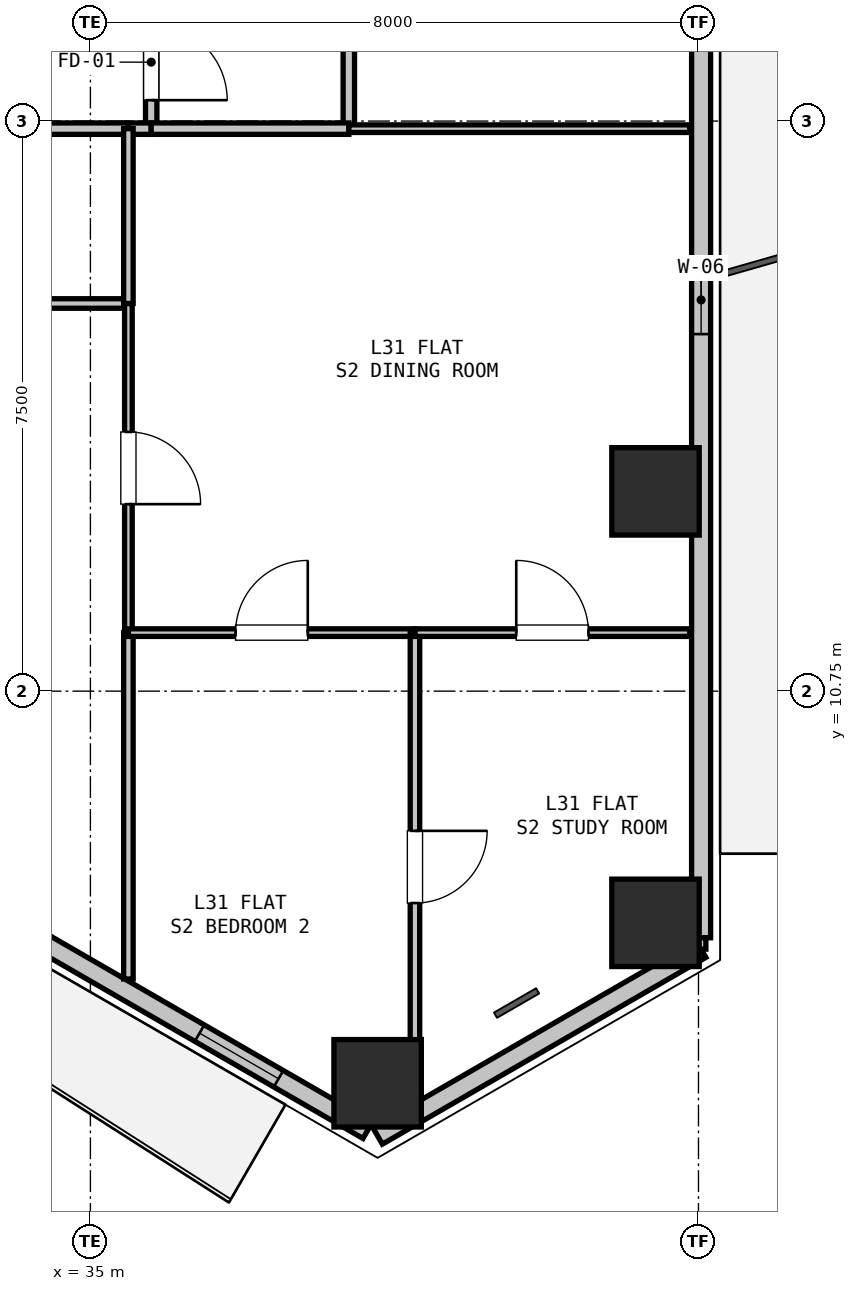
"""IFC4 building model, lengths in metres.
Left out: names, types, materials, properties, quantities, classifications, styles, units other than length and angle.
Written with IfcOpenShell. Run it as: python <this file> out.ifc"""

import sys

from ifc_helpers import new_model, si_unit, direction, frame, frame_2d, origin, origin_2d, place, context, subcontext, project, spatial, rectangle, hollow_rectangle, extrude, element, fill, save


model = new_model("IFC4")
c1 = context("Model", 3, precision=1e-05, world=origin(), true_north=direction((0.0, 1.0)))
c2 = subcontext(c1, "Body", "Model", "MODEL_VIEW")
j1 = project(units=[si_unit("LENGTHUNIT", "METRE"), si_unit("PLANEANGLEUNIT", "RADIAN")], contexts=[c1])
p1 = place(None, origin())
s1 = spatial("IfcSite", under=j1, at=p1, CompositionType="ELEMENT")
p2 = place(p1, origin())
s2 = spatial("IfcBuilding", under=s1, at=p2, CompositionType="ELEMENT")
p3 = place(p2, frame((0.0, 0.0, 113.1)))
s3 = spatial("IfcBuildingStorey", under=s2, at=p3, CompositionType="ELEMENT", Elevation=113.1)
for number, where, z_axis, x_axis in (
    (1, (42.435, 13.378, 0.0), (0.0, 0.0, 1.0), (1.0, 0.0, 0.0)),
    (2, (42.435, 7.702, 0.0), (0.0, 0.0, 1.0), (1.0, 0.0, 0.0)),
    (3, (38.779, 5.591, 0.0), (0.0, 0.0, 1.0), (1.0, 0.0, 0.0)),
):
    element("IfcColumn", number, at=place(p3, frame(where, z_axis=z_axis, x_axis=x_axis)), inside=s3, PredefinedType="COLUMN", context=c2, shape_type="SweptSolid", body=[
        extrude(hollow_rectangle(XDim=1.15, YDim=1.15, WallThickness=0.032, at=origin_2d()), origin(), (0.0, 0.0, 1.0), 3.3),
    ])
p4 = place(p3, frame((43.035, 7.356, 0.0), z_axis=(0.0, 0.0, 1.0), x_axis=(-0.866011848704, -0.500023477353, 0.0)))
e4 = element("IfcWall", 4, at=p4, inside=s3, PredefinedType="SOLIDWALL", context=c2, shape_type="SweptSolid", body=[
    extrude(rectangle(XDim=4.914, YDim=0.25, at=frame_2d((2.457, 0.0))), origin(), (0.0, 0.0, 1.0), 2.64),
])
p5 = place(p3, frame((43.035, 19.435, 0.0), z_axis=(0.0, 0.0, 1.0), x_axis=(0.0, -1.0, 0.0)))
e5 = element("IfcWall", 5, at=p5, inside=s3, PredefinedType="SOLIDWALL", context=c2, shape_type="SweptSolid", body=[
    extrude(rectangle(XDim=11.93, YDim=0.25, at=frame_2d((5.965, 0.0))), origin(), (0.0, 0.0, 1.0), 2.64),
])
p6 = place(p5, frame((3.088, 0.0, 0.9)))
e6 = element("IfcOpeningElement", 6, at=p6, cuts=e5, PredefinedType="OPENING", context=c2, shape_type="SweptSolid", body=[
    extrude(rectangle(XDim=0.9, YDim=1.4, at=frame_2d((0.45, 0.7))), frame((0.0, 0.135, 0.0), z_axis=(0.0, -1.0, 0.0), x_axis=(1.0, 0.0, 0.0)), (0.0, 0.0, 1.0), 0.27),
])
p7 = place(p3, frame((38.649, 4.973, 0.0), z_axis=(0.0, 0.0, 1.0), x_axis=(-0.866023023012, 0.500004123596, 0.0)))
e7 = element("IfcWall", 7, at=p7, inside=s3, PredefinedType="SOLIDWALL", context=c2, shape_type="SweptSolid", body=[
    extrude(rectangle(XDim=11.93, YDim=0.25, at=frame_2d((5.965, 0.0))), origin(), (0.0, 0.0, 1.0), 2.64),
])
p8 = place(p7, frame((7.616, 0.0, 0.0)))
e8 = element("IfcOpeningElement", 8, at=p8, cuts=e7, PredefinedType="OPENING", context=c2, shape_type="SweptSolid", body=[
    extrude(rectangle(XDim=1.1, YDim=2.1, at=frame_2d((0.55, 1.05))), frame((0.0, 0.135, 0.0), z_axis=(0.0, -1.0, 0.0), x_axis=(1.0, 0.0, 0.0)), (0.0, 0.0, 1.0), 0.27),
])
p9 = place(p7, frame((1.355, 0.0, 0.9)))
e9 = element("IfcOpeningElement", 9, at=p9, cuts=e7, PredefinedType="OPENING", context=c2, shape_type="SweptSolid", body=[
    extrude(rectangle(XDim=1.2, YDim=1.4, at=frame_2d((0.6, 0.7))), frame((0.0, 0.135, 0.0), z_axis=(0.0, -1.0, 0.0), x_axis=(1.0, 0.0, 0.0)), (0.0, 0.0, 1.0), 0.27),
])
p10 = place(p3, frame((35.8, 19.9, 0.0), z_axis=(0.0, 0.0, 1.0), x_axis=(0.0, -1.0, 0.0)))
e10 = element("IfcWall", 10, at=p10, inside=s3, PredefinedType="PARTITIONING", context=c2, shape_type="SweptSolid", body=[
    extrude(rectangle(XDim=1.75, YDim=0.15, at=frame_2d((0.875, 0.0))), origin(), (0.0, 0.0, 1.0), 3.02),
])
p11 = place(p10, frame((0.375, 0.0, 0.0)))
e11 = element("IfcOpeningElement", 11, at=p11, cuts=e10, PredefinedType="OPENING", context=c2, shape_type="SweptSolid", body=[
    extrude(rectangle(XDim=1.0, YDim=2.15, at=frame_2d((0.5, 1.075))), frame((0.0, 0.085, 0.0), z_axis=(0.0, -1.0, 0.0), x_axis=(1.0, 0.0, 0.0)), (0.0, 0.0, 1.0), 0.17),
])
p12 = place(p3, frame((35.8, 18.15, 0.0), z_axis=(0.0, 0.0, 1.0), x_axis=(-1.0, 0.0, 0.0)))
e12 = element("IfcWall", 12, at=p12, inside=s3, PredefinedType="PARTITIONING", context=c2, shape_type="SweptSolid", body=[
    extrude(rectangle(XDim=0.3, YDim=0.15, at=frame_2d((0.15, 0.0))), origin(), (0.0, 0.0, 1.0), 3.02),
])
p13 = place(p3, frame((35.5, 18.15, 0.0), z_axis=(0.0, 0.0, 1.0), x_axis=(-1.0, 0.0, 0.0)))
e13 = element("IfcWall", 13, at=p13, inside=s3, PredefinedType="PARTITIONING", context=c2, shape_type="SweptSolid", body=[
    extrude(rectangle(XDim=4.5, YDim=0.15, at=frame_2d((2.25, 0.0))), origin(), (0.0, 0.0, 1.0), 3.02),
])
p14 = place(p3, frame((38.4, 19.9, 0.0), z_axis=(0.0, 0.0, 1.0), x_axis=(0.0, -1.0, 0.0)))
e14 = element("IfcWall", 14, at=p14, inside=s3, PredefinedType="PARTITIONING", context=c2, shape_type="SweptSolid", body=[
    extrude(rectangle(XDim=1.75, YDim=0.15, at=frame_2d((0.875, 0.0))), origin(), (0.0, 0.0, 1.0), 3.02),
])
p15 = place(p3, frame((38.4, 18.15, 0.0), z_axis=(0.0, 0.0, 1.0), x_axis=(-1.0, 0.0, 0.0)))
e15 = element("IfcWall", 15, at=p15, inside=s3, PredefinedType="PARTITIONING", context=c2, shape_type="SweptSolid", body=[
    extrude(rectangle(XDim=2.6, YDim=0.15, at=frame_2d((1.3, 0.0))), origin(), (0.0, 0.0, 1.0), 2.393),
])
p16 = place(p3, frame((31.0, 15.85, 0.0), z_axis=(0.0, 0.0, 1.0), x_axis=(1.0, 0.0, 0.0)))
e16 = element("IfcWall", 16, at=p16, inside=s3, PredefinedType="PARTITIONING", context=c2, shape_type="SweptSolid", body=[
    extrude(rectangle(XDim=4.5, YDim=0.125, at=frame_2d((2.25, 0.0))), origin(), (0.0, 0.0, 1.0), 3.02),
])
p17 = place(p3, frame((35.5, 15.85, 0.0), z_axis=(0.0, 0.0, 1.0), x_axis=(0.0, -1.0, 0.0)))
e17 = element("IfcWall", 17, at=p17, inside=s3, PredefinedType="PARTITIONING", context=c2, shape_type="SweptSolid", body=[
    extrude(rectangle(XDim=4.33, YDim=0.1, at=frame_2d((2.165, 0.0))), origin(), (0.0, 0.0, 1.0), 3.02),
])
p18 = place(p17, frame((1.69, 0.0, 0.0)))
e18 = element("IfcOpeningElement", 18, at=p18, cuts=e17, PredefinedType="OPENING", context=c2, shape_type="SweptSolid", body=[
    extrude(rectangle(XDim=0.95, YDim=2.1, at=frame_2d((0.475, 1.05))), frame((0.0, 0.06, 0.0), z_axis=(0.0, -1.0, 0.0), x_axis=(1.0, 0.0, 0.0)), (0.0, 0.0, 1.0), 0.12),
])
p19 = place(p3, frame((35.5, 11.52, 0.0), z_axis=(0.0, 0.0, 1.0), x_axis=(0.0, -1.0, 0.0)))
e19 = element("IfcWall", 19, at=p19, inside=s3, PredefinedType="PARTITIONING", context=c2, shape_type="SweptSolid", body=[
    extrude(rectangle(XDim=4.557, YDim=0.125, at=frame_2d((2.278, 0.0))), origin(), (0.0, 0.0, 1.0), 2.684),
])
p20 = place(p3, frame((35.5, 11.52, 0.0), z_axis=(0.0, 0.0, 1.0), x_axis=(1.0, 0.0, 0.0)))
e20 = element("IfcWall", 20, at=p20, inside=s3, PredefinedType="PARTITIONING", context=c2, shape_type="SweptSolid", body=[
    extrude(rectangle(XDim=3.77, YDim=0.1, at=frame_2d((1.885, 0.0))), origin(), (0.0, 0.0, 1.0), 3.02),
])
p21 = place(p20, frame((1.41, 0.0, 0.0)))
e21 = element("IfcOpeningElement", 21, at=p21, cuts=e20, PredefinedType="OPENING", context=c2, shape_type="SweptSolid", body=[
    extrude(rectangle(XDim=0.95, YDim=2.1, at=frame_2d((0.475, 1.05))), frame((0.0, 0.06, 0.0), z_axis=(0.0, -1.0, 0.0), x_axis=(1.0, 0.0, 0.0)), (0.0, 0.0, 1.0), 0.12),
])
p22 = place(p3, frame((39.27, 11.52, 0.0), z_axis=(0.0, 0.0, 1.0), x_axis=(0.0, -1.0, 0.0)))
e22 = element("IfcWall", 22, at=p22, inside=s3, PredefinedType="PARTITIONING", context=c2, shape_type="SweptSolid", body=[
    extrude(rectangle(XDim=6.166, YDim=0.125, at=frame_2d((3.083, 0.0))), origin(), (0.0, 0.0, 1.0), 2.684),
])
p23 = place(p22, frame((2.608, 0.0, 0.0)))
e23 = element("IfcOpeningElement", 23, at=p23, cuts=e22, PredefinedType="OPENING", context=c2, shape_type="SweptSolid", body=[
    extrude(rectangle(XDim=0.95, YDim=2.1, at=frame_2d((0.475, 1.05))), frame((0.0, 0.073, 0.0), z_axis=(0.0, -1.0, 0.0), x_axis=(1.0, 0.0, 0.0)), (0.0, 0.0, 1.0), 0.145),
])
p24 = place(p3, frame((39.27, 11.52, 0.0), z_axis=(0.0, 0.0, 1.0), x_axis=(1.0, 0.0, 0.0)))
e24 = element("IfcWall", 24, at=p24, inside=s3, PredefinedType="PARTITIONING", context=c2, shape_type="SweptSolid", body=[
    extrude(rectangle(XDim=3.615, YDim=0.1, at=frame_2d((1.808, 0.0))), origin(), (0.0, 0.0, 1.0), 2.393),
])
p25 = place(p24, frame((1.333, 0.0, 0.0)))
e25 = element("IfcOpeningElement", 25, at=p25, cuts=e24, PredefinedType="OPENING", context=c2, shape_type="SweptSolid", body=[
    extrude(rectangle(XDim=0.95, YDim=2.1, at=frame_2d((0.475, 1.05))), frame((0.0, 0.06, 0.0), z_axis=(0.0, -1.0, 0.0), x_axis=(1.0, 0.0, 0.0)), (0.0, 0.0, 1.0), 0.12),
])
p26 = place(p3, frame((43.035, 7.506, 0.0), z_axis=(0.0, 0.0, 1.0), x_axis=(0.0, -1.0, 0.0)))
e26 = element("IfcWall", 26, at=p26, inside=s3, PredefinedType="PARTITIONING", context=c2, shape_type="SweptSolid", body=[
    extrude(rectangle(XDim=0.15, YDim=0.125, at=frame_2d((0.075, 0.0))), origin(), (0.0, 0.0, 1.0), 3.02),
])
p27 = place(p3, frame((38.4, 18.15, 0.0), z_axis=(0.0, 0.0, 1.0), x_axis=(1.0, 0.0, 0.0)))
e27 = element("IfcWall", 27, at=p27, inside=s3, PredefinedType="PARTITIONING", context=c2, shape_type="SweptSolid", body=[
    extrude(rectangle(XDim=4.486, YDim=0.1, at=frame_2d((2.243, 0.0))), origin(), (0.0, 0.0, 1.0), 2.365),
])
p28 = place(p3, frame((35.5, 15.85, 0.0), z_axis=(0.0, 0.0, 1.0), x_axis=(0.0, 1.0, 0.0)))
e28 = element("IfcWall", 28, at=p28, inside=s3, PredefinedType="PARTITIONING", context=c2, shape_type="SweptSolid", body=[
    extrude(rectangle(XDim=2.3, YDim=0.125, at=frame_2d((1.15, 0.0))), origin(), (0.0, 0.0, 1.0), 3.02),
])
p29 = place(p6, origin())
e29 = element("IfcWindow", 29, at=p29, inside=s3, PartitioningType="SINGLE_PANEL", PredefinedType="WINDOW", context=c2, shape_type="SweptSolid", body=[
    extrude(rectangle(XDim=0.9, YDim=1.4, at=frame_2d((0.45, 0.7))), frame((0.0, 0.03, 0.0), z_axis=(0.0, -1.0, 0.0), x_axis=(1.0, 0.0, 0.0)), (0.0, 0.0, 1.0), 0.06),
])
fill(e6, e29)
p30 = place(p9, origin())
e30 = element("IfcWindow", 30, at=p30, inside=s3, PartitioningType="SINGLE_PANEL", PredefinedType="WINDOW", context=c2, shape_type="SweptSolid", body=[
    extrude(rectangle(XDim=1.2, YDim=1.4, at=frame_2d((0.6, 0.7))), frame((0.0, 0.03, 0.0), z_axis=(0.0, -1.0, 0.0), x_axis=(1.0, 0.0, 0.0)), (0.0, 0.0, 1.0), 0.06),
])
fill(e9, e30)
p31 = place(p11, origin())
e31 = element("IfcDoor", 31, at=p31, inside=s3, OperationType="SINGLE_SWING_RIGHT", PredefinedType="DOOR", context=c2, shape_type="SweptSolid", body=[
    extrude(rectangle(XDim=1.0, YDim=2.15, at=frame_2d((0.5, 1.075))), frame((0.0, 0.025, 0.0), z_axis=(0.0, -1.0, 0.0), x_axis=(1.0, 0.0, 0.0)), (0.0, 0.0, 1.0), 0.05),
])
fill(e11, e31)
p32 = place(p18, origin())
e32 = element("IfcDoor", 32, at=p32, inside=s3, OperationType="SINGLE_SWING_RIGHT", PredefinedType="DOOR", context=c2, shape_type="SweptSolid", body=[
    extrude(rectangle(XDim=0.95, YDim=2.1, at=frame_2d((0.475, 1.05))), frame((0.0, 0.025, 0.0), z_axis=(0.0, -1.0, 0.0), x_axis=(1.0, 0.0, 0.0)), (0.0, 0.0, 1.0), 0.05),
])
fill(e18, e32)
p33 = place(p23, origin())
e33 = element("IfcDoor", 33, at=p33, inside=s3, OperationType="SINGLE_SWING_LEFT", PredefinedType="DOOR", context=c2, shape_type="SweptSolid", body=[
    extrude(rectangle(XDim=0.95, YDim=2.1, at=frame_2d((0.475, 1.05))), frame((0.0, 0.025, 0.0), z_axis=(0.0, -1.0, 0.0), x_axis=(1.0, 0.0, 0.0)), (0.0, 0.0, 1.0), 0.05),
])
fill(e23, e33)
p34 = place(p21, origin())
e34 = element("IfcDoor", 34, at=p34, inside=s3, OperationType="SINGLE_SWING_RIGHT", PredefinedType="DOOR", context=c2, shape_type="SweptSolid", body=[
    extrude(rectangle(XDim=0.95, YDim=2.1, at=frame_2d((0.475, 1.05))), frame((0.0, 0.025, 0.0), z_axis=(0.0, -1.0, 0.0), x_axis=(1.0, 0.0, 0.0)), (0.0, 0.0, 1.0), 0.05),
])
fill(e21, e34)
p35 = place(p25, origin())
e35 = element("IfcDoor", 35, at=p35, inside=s3, OperationType="SINGLE_SWING_LEFT", PredefinedType="DOOR", context=c2, shape_type="SweptSolid", body=[
    extrude(rectangle(XDim=0.95, YDim=2.1, at=frame_2d((0.475, 1.05))), frame((0.0, 0.025, 0.0), z_axis=(0.0, -1.0, 0.0), x_axis=(1.0, 0.0, 0.0)), (0.0, 0.0, 1.0), 0.05),
])
fill(e25, e35)
save(model, sys.argv[1])
